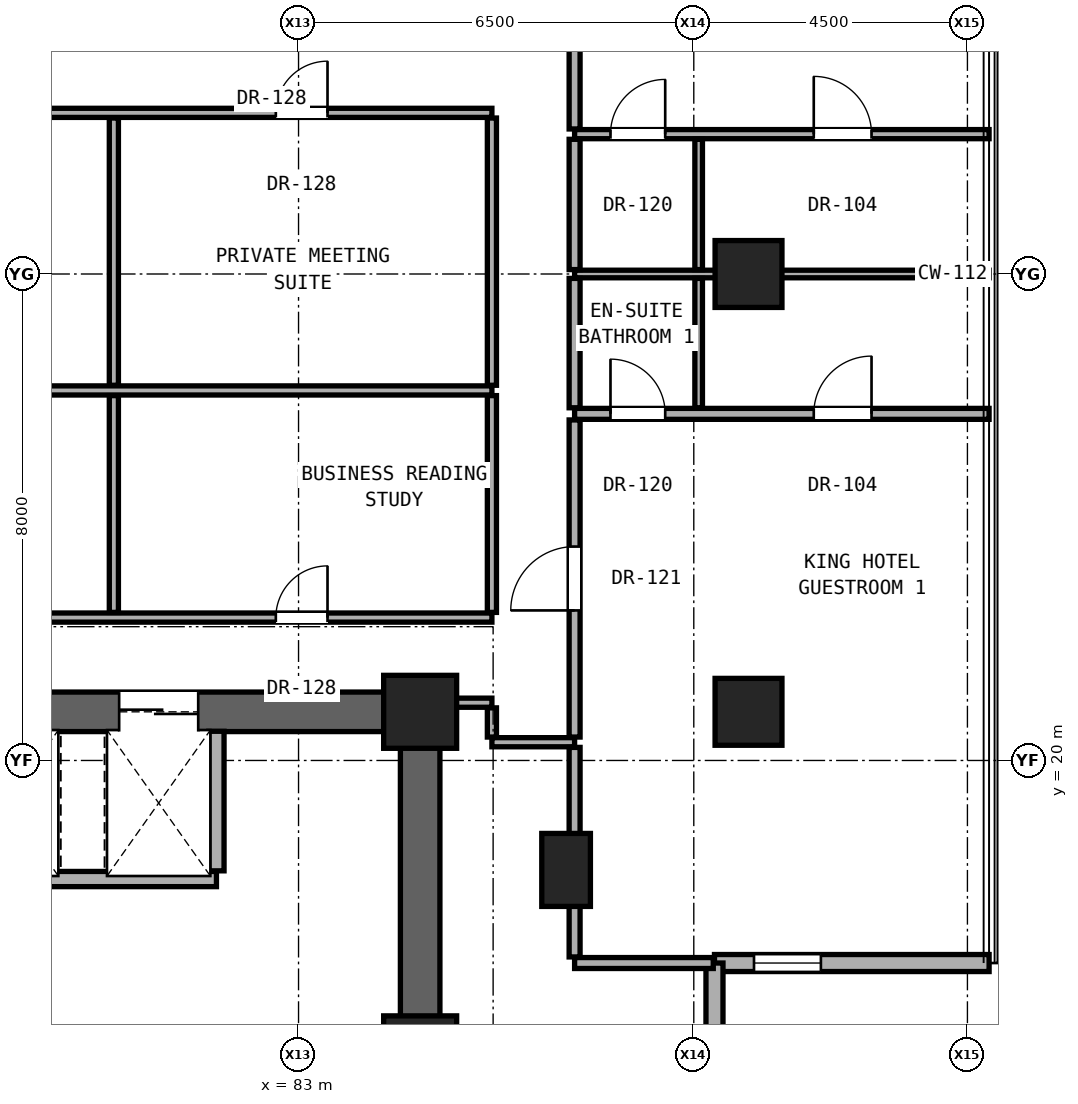
"""IFC4 building model, lengths in metres.
Left out: names, types, materials, properties, quantities, classifications, styles, units other than length and angle.
Written with IfcOpenShell. Run it as: python <this file> out.ifc"""

import sys

from ifc_helpers import new_model, si_unit, direction, frame, frame_2d, origin, origin_2d, place, context, subcontext, project, spatial, rectangle, hollow_rectangle, extrude, element, fill, save


model = new_model("IFC4")
c1 = context("Model", 3, precision=1e-05, world=origin(), true_north=direction((0.0, 1.0)))
c2 = subcontext(c1, "Body", "Model", "MODEL_VIEW")
j1 = project(units=[si_unit("LENGTHUNIT", "METRE"), si_unit("PLANEANGLEUNIT", "RADIAN")], contexts=[c1])
p1 = place(None, origin())
s1 = spatial("IfcSite", under=j1, at=p1, CompositionType="ELEMENT")
p2 = place(p1, origin())
s2 = spatial("IfcBuilding", under=s1, at=p2, CompositionType="ELEMENT")
p3 = place(p2, frame((0.0, 0.0, 98.3)))
s3 = spatial("IfcBuildingStorey", under=s2, at=p3, CompositionType="ELEMENT", Elevation=98.3)
for number, where, z_axis, x_axis in (
    (1, (85.0, 15.2, 0.0), (0.0, 0.0, 1.0), (1.0, 0.0, 0.0)),
    (2, (85.0, 20.8, 0.0), (0.0, 0.0, 1.0), (1.0, 0.0, 0.0)),
):
    element("IfcColumn", number, at=place(p3, frame(where, z_axis=z_axis, x_axis=x_axis)), inside=s3, PredefinedType="COLUMN", context=c2, shape_type="SweptSolid", body=[
        extrude(rectangle(XDim=1.2, YDim=1.2, at=origin_2d()), origin(), (0.0, 0.0, 1.0), 3.3),
    ])
for number, where, z_axis, x_axis in (
    (3, (90.4, 20.8, 0.0), (0.0, 0.0, 1.0), (1.0, 0.0, 0.0)),
    (4, (90.4, 28.0, 0.0), (0.0, 0.0, 1.0), (1.0, 0.0, 0.0)),
):
    element("IfcColumn", number, at=place(p3, frame(where, z_axis=z_axis, x_axis=x_axis)), inside=s3, PredefinedType="COLUMN", context=c2, shape_type="SweptSolid", body=[
        extrude(hollow_rectangle(XDim=1.1, YDim=1.1, WallThickness=0.06, at=origin_2d()), origin(), (0.0, 0.0, 1.0), 3.3),
    ])
p4 = place(p3, frame((87.4, 18.2, 0.0), z_axis=(0.0, 0.0, 1.0), x_axis=(1.0, 0.0, 0.0)))
e5 = element("IfcColumn", 5, at=p4, inside=s3, PredefinedType="PILASTER", context=c2, shape_type="SweptSolid", body=[
    extrude(rectangle(XDim=0.8, YDim=1.2, at=origin_2d()), origin(), (0.0, 0.0, 1.0), 3.3),
])
p5 = place(p3, frame((85.0, 15.2, 0.0), z_axis=(0.0, 0.0, 1.0), x_axis=(0.0, 1.0, 0.0)))
e6 = element("IfcWall", 6, at=p5, inside=s3, PredefinedType="SHEAR", context=c2, shape_type="SweptSolid", body=[
    extrude(rectangle(XDim=5.6, YDim=0.65, at=frame_2d((2.8, 0.0))), origin(), (0.0, 0.0, 1.0), 3.08),
])
p6 = place(p3, frame((68.0, 20.8, 0.0), z_axis=(0.0, 0.0, 1.0), x_axis=(1.0, 0.0, 0.0)))
e7 = element("IfcWall", 7, at=p6, inside=s3, PredefinedType="SHEAR", context=c2, shape_type="SweptSolid", body=[
    extrude(rectangle(XDim=17.0, YDim=0.65, at=frame_2d((8.5, 0.0))), origin(), (0.0, 0.0, 1.0), 3.08),
])
p7 = place(p6, frame((9.55, 0.0, 0.0)))
e8 = element("IfcOpeningElement", 8, at=p7, cuts=e7, PredefinedType="OPENING", context=c2, shape_type="SweptSolid", body=[
    extrude(rectangle(XDim=1.3, YDim=2.3, at=frame_2d((0.65, 1.15))), frame((0.0, 0.335, 0.0), z_axis=(0.0, -1.0, 0.0), x_axis=(1.0, 0.0, 0.0)), (0.0, 0.0, 1.0), 0.67),
])
p8 = place(p6, frame((12.05, 0.0, 0.0)))
e9 = element("IfcOpeningElement", 9, at=p8, cuts=e7, PredefinedType="OPENING", context=c2, shape_type="SweptSolid", body=[
    extrude(rectangle(XDim=1.3, YDim=2.3, at=frame_2d((0.65, 1.15))), frame((0.0, 0.335, 0.0), z_axis=(0.0, -1.0, 0.0), x_axis=(1.0, 0.0, 0.0)), (0.0, 0.0, 1.0), 0.67),
])
p9 = place(p3, frame((89.84, 16.669, 0.0), z_axis=(0.0, 0.0, 1.0), x_axis=(1.0, 0.0, 0.0)))
e10 = element("IfcWall", 10, at=p9, inside=s3, PredefinedType="SOLIDWALL", context=c2, shape_type="SweptSolid", body=[
    extrude(rectangle(XDim=4.516, YDim=0.28, at=frame_2d((2.258, 0.0))), origin(), (0.0, 0.0, 1.0), 3.06),
])
p10 = place(p9, frame((0.65, 0.0, 0.85)))
e11 = element("IfcOpeningElement", 11, at=p10, cuts=e10, PredefinedType="OPENING", context=c2, shape_type="SweptSolid", body=[
    extrude(rectangle(XDim=1.1, YDim=2.0, at=frame_2d((0.55, 1.0))), frame((0.0, 0.15, 0.0), z_axis=(0.0, -1.0, 0.0), x_axis=(1.0, 0.0, 0.0)), (0.0, 0.0, 1.0), 0.3),
])
p11 = place(p3, frame((89.84, 12.153, 0.0), z_axis=(0.0, 0.0, 1.0), x_axis=(0.0, 1.0, 0.0)))
e12 = element("IfcWall", 12, at=p11, inside=s3, PredefinedType="SOLIDWALL", context=c2, shape_type="SweptSolid", body=[
    extrude(rectangle(XDim=4.516, YDim=0.28, at=frame_2d((2.258, 0.0))), origin(), (0.0, 0.0, 1.0), 3.06),
])
p12 = place(p3, frame((87.54, 16.669, 0.0), z_axis=(0.0, 0.0, 1.0), x_axis=(1.0, 0.0, 0.0)))
e13 = element("IfcWall", 13, at=p12, inside=s3, PredefinedType="PARTITIONING", context=c2, shape_type="SweptSolid", body=[
    extrude(rectangle(XDim=2.28, YDim=0.18, at=frame_2d((1.14, 0.0))), origin(), (0.0, 0.0, 1.0), 3.08),
])
p13 = place(p3, frame((77.3, 18.05, 0.0), z_axis=(0.0, 0.0, 1.0), x_axis=(1.0, 0.0, 0.0)))
e14 = element("IfcWall", 14, at=p13, inside=s3, PredefinedType="SOLIDWALL", context=c2, shape_type="SweptSolid", body=[
    extrude(rectangle(XDim=4.35, YDim=0.25, at=frame_2d((2.175, 0.0))), origin(), (0.0, 0.0, 1.0), 3.08),
])
p14 = place(p3, frame((86.18, 20.3, 0.0), z_axis=(0.0, 0.0, 1.0), x_axis=(1.0, 0.0, 0.0)))
e15 = element("IfcWall", 15, at=p14, inside=s3, PredefinedType="PARTITIONING", context=c2, shape_type="SweptSolid", body=[
    extrude(rectangle(XDim=1.36, YDim=0.15, at=frame_2d((0.68, 0.0))), origin(), (0.0, 0.0, 1.0), 3.08),
])
p15 = place(p3, frame((85.32, 20.95, 0.0), z_axis=(0.0, 0.0, 1.0), x_axis=(1.0, 0.0, 0.0)))
e16 = element("IfcWall", 16, at=p15, inside=s3, PredefinedType="PARTITIONING", context=c2, shape_type="SweptSolid", body=[
    extrude(rectangle(XDim=0.86, YDim=0.15, at=frame_2d((0.43, 0.0))), origin(), (0.0, 0.0, 1.0), 2.472),
])
p16 = place(p3, frame((66.68, 22.35, 0.0), z_axis=(0.0, 0.0, 1.0), x_axis=(1.0, 0.0, 0.0)))
e17 = element("IfcWall", 17, at=p16, inside=s3, PredefinedType="PARTITIONING", context=c2, shape_type="SweptSolid", body=[
    extrude(rectangle(XDim=19.5, YDim=0.15, at=frame_2d((9.75, 0.0))), origin(), (0.0, 0.0, 1.0), 2.145),
])
p17 = place(p16, frame((8.902, 0.0, 0.0)))
e18 = element("IfcOpeningElement", 18, at=p17, cuts=e17, PredefinedType="OPENING", context=c2, shape_type="SweptSolid", body=[
    extrude(rectangle(XDim=0.85, YDim=2.01, at=frame_2d((0.425, 1.005))), frame((0.0, 0.085, 0.0), z_axis=(0.0, -1.0, 0.0), x_axis=(1.0, 0.0, 0.0)), (0.0, 0.0, 1.0), 0.17),
])
p18 = place(p16, frame((15.947, 0.0, 0.0)))
e19 = element("IfcOpeningElement", 19, at=p18, cuts=e17, PredefinedType="OPENING", context=c2, shape_type="SweptSolid", body=[
    extrude(rectangle(XDim=0.85, YDim=2.01, at=frame_2d((0.425, 1.005))), frame((0.0, 0.085, 0.0), z_axis=(0.0, -1.0, 0.0), x_axis=(1.0, 0.0, 0.0)), (0.0, 0.0, 1.0), 0.17),
])
p19 = place(p3, frame((87.54, 25.7, 0.0), z_axis=(0.0, 0.0, 1.0), x_axis=(1.0, 0.0, 0.0)))
e20 = element("IfcWall", 20, at=p19, inside=s3, PredefinedType="PARTITIONING", context=c2, shape_type="SweptSolid", body=[
    extrude(rectangle(XDim=6.816, YDim=0.18, at=frame_2d((3.408, 0.0))), origin(), (0.0, 0.0, 1.0), 2.216),
])
p20 = place(p19, frame((3.933, 0.0, 0.0)))
e21 = element("IfcOpeningElement", 21, at=p20, cuts=e20, PredefinedType="OPENING", context=c2, shape_type="SweptSolid", body=[
    extrude(rectangle(XDim=0.95, YDim=2.15, at=frame_2d((0.475, 1.075))), frame((0.0, 0.1, 0.0), z_axis=(0.0, -1.0, 0.0), x_axis=(1.0, 0.0, 0.0)), (0.0, 0.0, 1.0), 0.2),
])
p21 = place(p19, frame((0.59, 0.0, 0.0)))
e22 = element("IfcOpeningElement", 22, at=p21, cuts=e20, PredefinedType="OPENING", context=c2, shape_type="SweptSolid", body=[
    extrude(rectangle(XDim=0.9, YDim=2.1, at=frame_2d((0.45, 1.05))), frame((0.0, 0.1, 0.0), z_axis=(0.0, -1.0, 0.0), x_axis=(1.0, 0.0, 0.0)), (0.0, 0.0, 1.0), 0.2),
])
p22 = place(p3, frame((72.05, 26.085, 0.0), z_axis=(0.0, 0.0, 1.0), x_axis=(1.0, 0.0, 0.0)))
e23 = element("IfcWall", 23, at=p22, inside=s3, PredefinedType="PARTITIONING", context=c2, shape_type="SweptSolid", body=[
    extrude(rectangle(XDim=14.13, YDim=0.15, at=frame_2d((7.065, 0.0))), origin(), (0.0, 0.0, 1.0), 2.145),
])
p23 = place(p3, frame((87.54, 28.0, 0.0), z_axis=(0.0, 0.0, 1.0), x_axis=(1.0, 0.0, 0.0)))
e24 = element("IfcWall", 24, at=p23, inside=s3, PredefinedType="PARTITIONING", context=c2, shape_type="SweptSolid", body=[
    extrude(rectangle(XDim=6.816, YDim=0.125, at=frame_2d((3.408, 0.0))), origin(), (0.0, 0.0, 1.0), 2.216),
])
p24 = place(p3, frame((87.54, 30.3, 0.0), z_axis=(0.0, 0.0, 1.0), x_axis=(1.0, 0.0, 0.0)))
e25 = element("IfcWall", 25, at=p24, inside=s3, PredefinedType="PARTITIONING", context=c2, shape_type="SweptSolid", body=[
    extrude(rectangle(XDim=6.816, YDim=0.15, at=frame_2d((3.408, 0.0))), origin(), (0.0, 0.0, 1.0), 2.216),
])
p25 = place(p24, frame((3.933, 0.0, 0.0)))
e26 = element("IfcOpeningElement", 26, at=p25, cuts=e25, PredefinedType="OPENING", context=c2, shape_type="SweptSolid", body=[
    extrude(rectangle(XDim=0.95, YDim=2.15, at=frame_2d((0.475, 1.075))), frame((0.0, 0.085, 0.0), z_axis=(0.0, -1.0, 0.0), x_axis=(1.0, 0.0, 0.0)), (0.0, 0.0, 1.0), 0.17),
])
p26 = place(p24, frame((0.59, 0.0, 0.0)))
e27 = element("IfcOpeningElement", 27, at=p26, cuts=e25, PredefinedType="OPENING", context=c2, shape_type="SweptSolid", body=[
    extrude(rectangle(XDim=0.9, YDim=2.1, at=frame_2d((0.45, 1.05))), frame((0.0, 0.085, 0.0), z_axis=(0.0, -1.0, 0.0), x_axis=(1.0, 0.0, 0.0)), (0.0, 0.0, 1.0), 0.17),
])
p27 = place(p3, frame((66.68, 30.65, 0.0), z_axis=(0.0, 0.0, 1.0), x_axis=(1.0, 0.0, 0.0)))
e28 = element("IfcWall", 28, at=p27, inside=s3, PredefinedType="PARTITIONING", context=c2, shape_type="SweptSolid", body=[
    extrude(rectangle(XDim=19.5, YDim=0.15, at=frame_2d((9.75, 0.0))), origin(), (0.0, 0.0, 1.0), 2.145),
])
p28 = place(p27, frame((3.795, 0.0, 0.0)))
e29 = element("IfcOpeningElement", 29, at=p28, cuts=e28, PredefinedType="OPENING", context=c2, shape_type="SweptSolid", body=[
    extrude(rectangle(XDim=0.85, YDim=2.01, at=frame_2d((0.425, 1.005))), frame((0.0, 0.085, 0.0), z_axis=(0.0, -1.0, 0.0), x_axis=(1.0, 0.0, 0.0)), (0.0, 0.0, 1.0), 0.17),
])
p29 = place(p27, frame((8.902, 0.0, 0.0)))
e30 = element("IfcOpeningElement", 30, at=p29, cuts=e28, PredefinedType="OPENING", context=c2, shape_type="SweptSolid", body=[
    extrude(rectangle(XDim=0.85, YDim=2.01, at=frame_2d((0.425, 1.005))), frame((0.0, 0.085, 0.0), z_axis=(0.0, -1.0, 0.0), x_axis=(1.0, 0.0, 0.0)), (0.0, 0.0, 1.0), 0.17),
])
p30 = place(p27, frame((15.947, 0.0, 0.0)))
e31 = element("IfcOpeningElement", 31, at=p30, cuts=e28, PredefinedType="OPENING", context=c2, shape_type="SweptSolid", body=[
    extrude(rectangle(XDim=0.85, YDim=2.01, at=frame_2d((0.425, 1.005))), frame((0.0, 0.085, 0.0), z_axis=(0.0, -1.0, 0.0), x_axis=(1.0, 0.0, 0.0)), (0.0, 0.0, 1.0), 0.17),
])
p31 = place(p3, frame((79.963, 22.435, 0.0), z_axis=(0.0, 0.0, 1.0), x_axis=(0.0, 1.0, 0.0)))
e32 = element("IfcWall", 32, at=p31, inside=s3, PredefinedType="PARTITIONING", context=c2, shape_type="SweptSolid", body=[
    extrude(rectangle(XDim=3.565, YDim=0.15, at=frame_2d((1.782, 0.0))), origin(), (0.0, 0.0, 1.0), 3.08),
])
p32 = place(p3, frame((79.963, 26.17, 0.0), z_axis=(0.0, 0.0, 1.0), x_axis=(0.0, 1.0, 0.0)))
e33 = element("IfcWall", 33, at=p32, inside=s3, PredefinedType="PARTITIONING", context=c2, shape_type="SweptSolid", body=[
    extrude(rectangle(XDim=4.395, YDim=0.15, at=frame_2d((2.198, 0.0))), origin(), (0.0, 0.0, 1.0), 2.145),
])
p33 = place(p3, frame((81.65, 18.185, 0.0), z_axis=(0.0, 0.0, 1.0), x_axis=(0.0, 1.0, 0.0)))
e34 = element("IfcWall", 34, at=p33, inside=s3, PredefinedType="SOLIDWALL", context=c2, shape_type="SweptSolid", body=[
    extrude(rectangle(XDim=2.295, YDim=0.25, at=frame_2d((1.147, 0.0))), origin(), (0.0, 0.0, 1.0), 3.08),
])
p34 = place(p3, frame((86.18, 20.385, 0.0), z_axis=(0.0, 0.0, 1.0), x_axis=(0.0, 1.0, 0.0)))
e35 = element("IfcWall", 35, at=p34, inside=s3, PredefinedType="PARTITIONING", context=c2, shape_type="SweptSolid", body=[
    extrude(rectangle(XDim=0.48, YDim=0.15, at=frame_2d((0.24, 0.0))), origin(), (0.0, 0.0, 1.0), 2.472),
])
p35 = place(p3, frame((86.18, 22.435, 0.0), z_axis=(0.0, 0.0, 1.0), x_axis=(0.0, 1.0, 0.0)))
e36 = element("IfcWall", 36, at=p35, inside=s3, PredefinedType="PARTITIONING", context=c2, shape_type="SweptSolid", body=[
    extrude(rectangle(XDim=3.565, YDim=0.15, at=frame_2d((1.782, 0.0))), origin(), (0.0, 0.0, 1.0), 3.08),
])
p36 = place(p3, frame((86.18, 26.17, 0.0), z_axis=(0.0, 0.0, 1.0), x_axis=(0.0, 1.0, 0.0)))
e37 = element("IfcWall", 37, at=p36, inside=s3, PredefinedType="PARTITIONING", context=c2, shape_type="SweptSolid", body=[
    extrude(rectangle(XDim=4.395, YDim=0.15, at=frame_2d((2.198, 0.0))), origin(), (0.0, 0.0, 1.0), 2.299),
])
p37 = place(p3, frame((87.54, 16.769, 0.0), z_axis=(0.0, 0.0, 1.0), x_axis=(0.0, 1.0, 0.0)))
e38 = element("IfcWall", 38, at=p37, inside=s3, PredefinedType="PARTITIONING", context=c2, shape_type="SweptSolid", body=[
    extrude(rectangle(XDim=3.446, YDim=0.18, at=frame_2d((1.723, 0.0))), origin(), (0.0, 0.0, 1.0), 2.456),
])
p38 = place(p3, frame((87.54, 20.385, 0.0), z_axis=(0.0, 0.0, 1.0), x_axis=(0.0, 1.0, 0.0)))
e39 = element("IfcWall", 39, at=p38, inside=s3, PredefinedType="PARTITIONING", context=c2, shape_type="SweptSolid", body=[
    extrude(rectangle(XDim=5.215, YDim=0.18, at=frame_2d((2.607, 0.0))), origin(), (0.0, 0.0, 1.0), 2.472),
])
p39 = place(p38, frame((2.083, 0.0, 0.0)))
e40 = element("IfcOpeningElement", 40, at=p39, cuts=e39, PredefinedType="OPENING", context=c2, shape_type="SweptSolid", body=[
    extrude(rectangle(XDim=1.05, YDim=2.2, at=frame_2d((0.525, 1.1))), frame((0.0, 0.1, 0.0), z_axis=(0.0, -1.0, 0.0), x_axis=(1.0, 0.0, 0.0)), (0.0, 0.0, 1.0), 0.2),
])
p40 = place(p3, frame((87.54, 25.8, 0.0), z_axis=(0.0, 0.0, 1.0), x_axis=(0.0, 1.0, 0.0)))
e41 = element("IfcWall", 41, at=p40, inside=s3, PredefinedType="PARTITIONING", context=c2, shape_type="SweptSolid", body=[
    extrude(rectangle(XDim=2.127, YDim=0.18, at=frame_2d((1.064, 0.0))), origin(), (0.0, 0.0, 1.0), 2.299),
])
p41 = place(p3, frame((87.54, 28.073, 0.0), z_axis=(0.0, 0.0, 1.0), x_axis=(0.0, 1.0, 0.0)))
e42 = element("IfcWall", 42, at=p41, inside=s3, PredefinedType="PARTITIONING", context=c2, shape_type="SweptSolid", body=[
    extrude(rectangle(XDim=2.143, YDim=0.18, at=frame_2d((1.071, 0.0))), origin(), (0.0, 0.0, 1.0), 2.299),
])
p42 = place(p3, frame((87.54, 30.385, 0.0), z_axis=(0.0, 0.0, 1.0), x_axis=(0.0, 1.0, 0.0)))
e43 = element("IfcWall", 43, at=p42, inside=s3, PredefinedType="PARTITIONING", context=c2, shape_type="SweptSolid", body=[
    extrude(rectangle(XDim=5.23, YDim=0.18, at=frame_2d((2.615, 0.0))), origin(), (0.0, 0.0, 1.0), 2.472),
])
p43 = place(p42, frame((2.09, 0.0, 0.0)))
e44 = element("IfcOpeningElement", 44, at=p43, cuts=e43, PredefinedType="OPENING", context=c2, shape_type="SweptSolid", body=[
    extrude(rectangle(XDim=1.05, YDim=2.2, at=frame_2d((0.525, 1.1))), frame((0.0, 0.1, 0.0), z_axis=(0.0, -1.0, 0.0), x_axis=(1.0, 0.0, 0.0)), (0.0, 0.0, 1.0), 0.2),
])
p44 = place(p3, frame((89.58, 25.8, 0.0), z_axis=(0.0, 0.0, 1.0), x_axis=(0.0, 1.0, 0.0)))
e45 = element("IfcWall", 45, at=p44, inside=s3, PredefinedType="PARTITIONING", context=c2, shape_type="SweptSolid", body=[
    extrude(rectangle(XDim=2.127, YDim=0.125, at=frame_2d((1.064, 0.0))), origin(), (0.0, 0.0, 1.0), 2.299),
])
p45 = place(p3, frame((89.58, 28.073, 0.0), z_axis=(0.0, 0.0, 1.0), x_axis=(0.0, 1.0, 0.0)))
e46 = element("IfcWall", 46, at=p45, inside=s3, PredefinedType="PARTITIONING", context=c2, shape_type="SweptSolid", body=[
    extrude(rectangle(XDim=2.143, YDim=0.125, at=frame_2d((1.071, 0.0))), origin(), (0.0, 0.0, 1.0), 2.299),
])
p46 = place(p10, origin())
e47 = element("IfcWindow", 47, at=p46, inside=s3, PartitioningType="SINGLE_PANEL", PredefinedType="WINDOW", context=c2, shape_type="SweptSolid", body=[
    extrude(rectangle(XDim=1.1, YDim=2.0, at=frame_2d((0.55, 1.0))), frame((0.0, 0.03, 0.0), z_axis=(0.0, -1.0, 0.0), x_axis=(1.0, 0.0, 0.0)), (0.0, 0.0, 1.0), 0.06),
])
fill(e11, e47)
p47 = place(p39, origin())
e48 = element("IfcDoor", 48, at=p47, inside=s3, OperationType="SINGLE_SWING_LEFT", PredefinedType="DOOR", context=c2, shape_type="SweptSolid", body=[
    extrude(rectangle(XDim=1.05, YDim=2.2, at=frame_2d((0.525, 1.1))), frame((0.0, 0.025, 0.0), z_axis=(0.0, -1.0, 0.0), x_axis=(1.0, 0.0, 0.0)), (0.0, 0.0, 1.0), 0.05),
])
fill(e40, e48)
p48 = place(p20, origin())
e49 = element("IfcDoor", 49, at=p48, inside=s3, OperationType="SINGLE_SWING_RIGHT", PredefinedType="DOOR", context=c2, shape_type="SweptSolid", body=[
    extrude(rectangle(XDim=0.95, YDim=2.15, at=frame_2d((0.475, 1.075))), frame((0.0, 0.025, 0.0), z_axis=(0.0, -1.0, 0.0), x_axis=(1.0, 0.0, 0.0)), (0.0, 0.0, 1.0), 0.05),
])
fill(e21, e49)
p49 = place(p21, origin())
e50 = element("IfcDoor", 50, at=p49, inside=s3, OperationType="SINGLE_SWING_LEFT", PredefinedType="DOOR", context=c2, shape_type="SweptSolid", body=[
    extrude(rectangle(XDim=0.9, YDim=2.1, at=frame_2d((0.45, 1.05))), frame((0.0, 0.025, 0.0), z_axis=(0.0, -1.0, 0.0), x_axis=(1.0, 0.0, 0.0)), (0.0, 0.0, 1.0), 0.05),
])
fill(e22, e50)
p50 = place(p25, origin())
e51 = element("IfcDoor", 51, at=p50, inside=s3, OperationType="SINGLE_SWING_LEFT", PredefinedType="DOOR", context=c2, shape_type="SweptSolid", body=[
    extrude(rectangle(XDim=0.95, YDim=2.15, at=frame_2d((0.475, 1.075))), frame((0.0, 0.025, 0.0), z_axis=(0.0, -1.0, 0.0), x_axis=(1.0, 0.0, 0.0)), (0.0, 0.0, 1.0), 0.05),
])
fill(e26, e51)
p51 = place(p26, origin())
e52 = element("IfcDoor", 52, at=p51, inside=s3, OperationType="SINGLE_SWING_RIGHT", PredefinedType="DOOR", context=c2, shape_type="SweptSolid", body=[
    extrude(rectangle(XDim=0.9, YDim=2.1, at=frame_2d((0.45, 1.05))), frame((0.0, 0.025, 0.0), z_axis=(0.0, -1.0, 0.0), x_axis=(1.0, 0.0, 0.0)), (0.0, 0.0, 1.0), 0.05),
])
fill(e27, e52)
p52 = place(p18, origin())
e53 = element("IfcDoor", 53, at=p52, inside=s3, OperationType="SINGLE_SWING_RIGHT", PredefinedType="DOOR", context=c2, shape_type="SweptSolid", body=[
    extrude(rectangle(XDim=0.85, YDim=2.01, at=frame_2d((0.425, 1.005))), frame((0.0, 0.025, 0.0), z_axis=(0.0, -1.0, 0.0), x_axis=(1.0, 0.0, 0.0)), (0.0, 0.0, 1.0), 0.05),
])
fill(e19, e53)
p53 = place(p30, origin())
e54 = element("IfcDoor", 54, at=p53, inside=s3, OperationType="SINGLE_SWING_RIGHT", PredefinedType="DOOR", context=c2, shape_type="SweptSolid", body=[
    extrude(rectangle(XDim=0.85, YDim=2.01, at=frame_2d((0.425, 1.005))), frame((0.0, 0.025, 0.0), z_axis=(0.0, -1.0, 0.0), x_axis=(1.0, 0.0, 0.0)), (0.0, 0.0, 1.0), 0.05),
])
fill(e31, e54)
p54 = place(p8, origin())
e55 = element("IfcDoor", 55, at=p54, inside=s3, OperationType="DOUBLE_DOOR_SLIDING", PredefinedType="DOOR", context=c2, shape_type="SweptSolid", body=[
    extrude(rectangle(XDim=1.3, YDim=2.3, at=frame_2d((0.65, 1.15))), frame((0.0, 0.025, 0.0), z_axis=(0.0, -1.0, 0.0), x_axis=(1.0, 0.0, 0.0)), (0.0, 0.0, 1.0), 0.05),
])
fill(e9, e55)
save(model, sys.argv[1])
